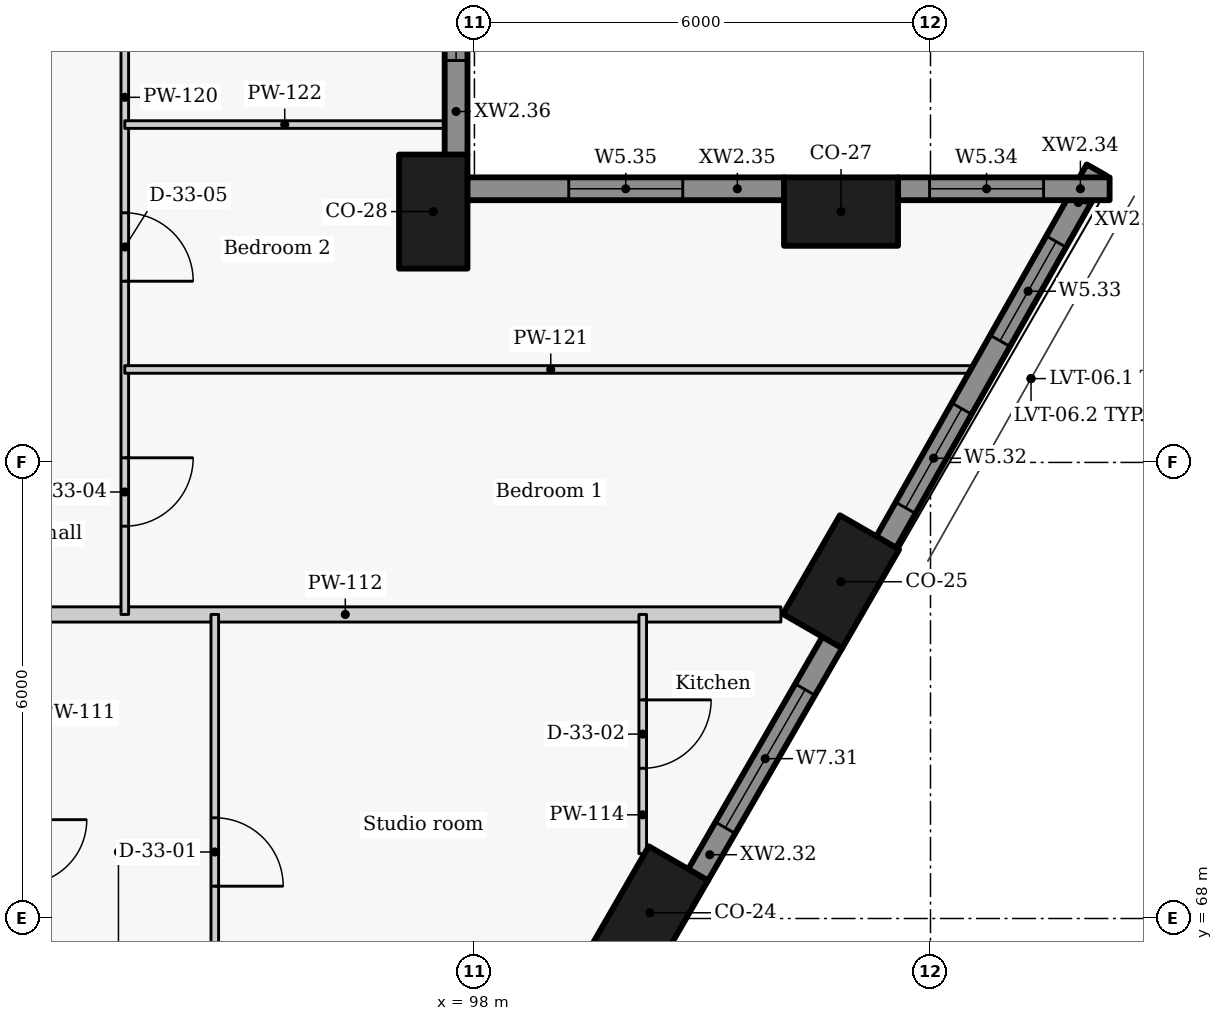
"""IFC4 building model, lengths in metres.
Left out: names, types, materials, properties, quantities, classifications, styles, units other than length and angle.
Written with IfcOpenShell. Run it as: python <this file> out.ifc"""

import sys

from ifc_helpers import new_model, si_unit, direction, frame, frame_2d, origin, origin_2d, place, context, subcontext, project, spatial, rectangle, extrude, element, fill, save


model = new_model("IFC4")
c1 = context("Model", 3, precision=1e-05, world=origin(), true_north=direction((0.0, 1.0)))
c2 = subcontext(c1, "Body", "Model", "MODEL_VIEW")
j1 = project(units=[si_unit("LENGTHUNIT", "METRE"), si_unit("PLANEANGLEUNIT", "RADIAN")], contexts=[c1])
p1 = place(None, origin())
s1 = spatial("IfcSite", under=j1, at=p1, CompositionType="ELEMENT")
p2 = place(p1, origin())
s2 = spatial("IfcBuilding", under=s1, at=p2, CompositionType="ELEMENT")
p3 = place(p2, frame((0.0, 0.0, 51.3)))
s3 = spatial("IfcBuildingStorey", under=s2, at=p3, CompositionType="ELEMENT", Elevation=51.3)
for number, where, z_axis, x_axis in (
    (1, (100.308, 68.075, 0.0), (0.0, 0.0, 1.0), (0.5, 0.866, 0.0)),
    (2, (102.823, 72.43, 0.0), (0.0, 0.0, 1.0), (0.5, 0.866, 0.0)),
    (3, (102.823, 77.3, 0.0), (0.0, 0.0, 1.0), (-1.0, 0.0, 0.0)),
    (4, (97.458, 77.3, 0.0), (0.0, 0.0, 1.0), (0.0, 1.0, 0.0)),
):
    element("IfcColumn", number, at=place(p3, frame(where, z_axis=z_axis, x_axis=x_axis)), inside=s3, PredefinedType="COLUMN", context=c2, shape_type="SweptSolid", body=[
        extrude(rectangle(XDim=1.5, YDim=0.9, at=origin_2d()), origin(), (0.0, 0.0, 1.0), 3.3),
    ])
p4 = place(p3, frame((100.941, 68.571, 0.0), z_axis=(0.0, 0.0, 1.0), x_axis=(0.499977402622, 0.866038449993, 0.0)))
e5 = element("IfcWall", 5, at=p4, inside=s3, PredefinedType="SOLIDWALL", context=c2, shape_type="SweptSolid", body=[
    extrude(rectangle(XDim=3.537, YDim=0.3, at=frame_2d((1.769, 0.0))), origin(), (0.0, 0.0, 1.0), 2.425),
])
p5 = place(p4, frame((0.719, 0.0, 0.9)))
e6 = element("IfcOpeningElement", 6, at=p5, cuts=e5, PredefinedType="OPENING", context=c2, shape_type="SweptSolid", body=[
    extrude(rectangle(XDim=2.1, YDim=1.1, at=frame_2d((1.05, 0.55))), frame((0.0, 0.16, 0.0), z_axis=(0.0, -1.0, 0.0), x_axis=(1.0, 0.0, 0.0)), (0.0, 0.0, 1.0), 0.32),
])
p6 = place(p3, frame((103.416, 72.949, 0.0), z_axis=(0.0, 0.0, 1.0), x_axis=(0.492363204642, 0.870389840655, 0.0)))
e7 = element("IfcWall", 7, at=p6, inside=s3, PredefinedType="SOLIDWALL", context=c2, shape_type="SweptSolid", body=[
    extrude(rectangle(XDim=5.626, YDim=0.3, at=frame_2d((2.813, 0.0))), origin(), (0.0, 0.0, 1.0), 2.425),
])
p7 = place(p6, frame((0.521, 0.0, 0.9)))
e8 = element("IfcOpeningElement", 8, at=p7, cuts=e7, PredefinedType="OPENING", context=c2, shape_type="SweptSolid", body=[
    extrude(rectangle(XDim=1.5, YDim=1.1, at=frame_2d((0.75, 0.55))), frame((0.0, 0.16, 0.0), z_axis=(0.0, -1.0, 0.0), x_axis=(1.0, 0.0, 0.0)), (0.0, 0.0, 1.0), 0.32),
])
p8 = place(p6, frame((3.045, 0.0, 0.9)))
e9 = element("IfcOpeningElement", 9, at=p8, cuts=e7, PredefinedType="OPENING", context=c2, shape_type="SweptSolid", body=[
    extrude(rectangle(XDim=1.5, YDim=1.1, at=frame_2d((0.75, 0.55))), frame((0.0, 0.16, 0.0), z_axis=(0.0, -1.0, 0.0), x_axis=(1.0, 0.0, 0.0)), (0.0, 0.0, 1.0), 0.32),
])
p9 = place(p3, frame((106.357, 77.6, 0.0), z_axis=(0.0, 0.0, 1.0), x_axis=(-1.0, 0.0, 0.0)))
e10 = element("IfcWall", 10, at=p9, inside=s3, PredefinedType="SOLIDWALL", context=c2, shape_type="SweptSolid", body=[
    extrude(rectangle(XDim=2.788, YDim=0.3, at=frame_2d((1.394, 0.0))), origin(), (0.0, 0.0, 1.0), 2.425),
])
p10 = place(p9, frame((0.869, 0.0, 0.9)))
e11 = element("IfcOpeningElement", 11, at=p10, cuts=e10, PredefinedType="OPENING", context=c2, shape_type="SweptSolid", body=[
    extrude(rectangle(XDim=1.5, YDim=1.1, at=frame_2d((0.75, 0.55))), frame((0.0, 0.16, 0.0), z_axis=(0.0, -1.0, 0.0), x_axis=(1.0, 0.0, 0.0)), (0.0, 0.0, 1.0), 0.32),
])
p11 = place(p3, frame((102.077, 77.6, 0.0), z_axis=(0.0, 0.0, 1.0), x_axis=(-1.0, 0.0, 0.0)))
e12 = element("IfcWall", 12, at=p11, inside=s3, PredefinedType="SOLIDWALL", context=c2, shape_type="SweptSolid", body=[
    extrude(rectangle(XDim=4.173, YDim=0.3, at=frame_2d((2.086, 0.0))), origin(), (0.0, 0.0, 1.0), 2.425),
])
p12 = place(p11, frame((1.336, 0.0, 0.9)))
e13 = element("IfcOpeningElement", 13, at=p12, cuts=e12, PredefinedType="OPENING", context=c2, shape_type="SweptSolid", body=[
    extrude(rectangle(XDim=1.5, YDim=1.1, at=frame_2d((0.75, 0.55))), frame((0.0, 0.16, 0.0), z_axis=(0.0, -1.0, 0.0), x_axis=(1.0, 0.0, 0.0)), (0.0, 0.0, 1.0), 0.32),
])
p13 = place(p3, frame((97.758, 78.046, 0.0), z_axis=(0.0, 0.0, 1.0), x_axis=(0.0, 1.0, 0.0)))
e14 = element("IfcWall", 14, at=p13, inside=s3, PredefinedType="SOLIDWALL", context=c2, shape_type="SweptSolid", body=[
    extrude(rectangle(XDim=4.208, YDim=0.3, at=frame_2d((2.104, 0.0))), origin(), (0.0, 0.0, 1.0), 2.425),
])
p14 = place(p13, frame((1.242, 0.0, 0.9)))
e15 = element("IfcOpeningElement", 15, at=p14, cuts=e14, PredefinedType="OPENING", context=c2, shape_type="SweptSolid", body=[
    extrude(rectangle(XDim=2.1, YDim=1.1, at=frame_2d((1.05, 0.55))), frame((0.0, 0.16, 0.0), z_axis=(0.0, -1.0, 0.0), x_axis=(1.0, 0.0, 0.0)), (0.0, 0.0, 1.0), 0.32),
])
p15 = place(p3, frame((90.57, 72.0, 0.0), z_axis=(0.0, 0.0, 1.0), x_axis=(1.0, 0.0, 0.0)))
e16 = element("IfcWall", 16, at=p15, inside=s3, PredefinedType="PARTITIONING", context=c2, shape_type="SweptSolid", body=[
    extrude(rectangle(XDim=11.462, YDim=0.2, at=frame_2d((5.731, 0.0))), origin(), (0.0, 0.0, 1.0), 3.025),
])
p16 = place(p3, frame((94.584, 72.0, 0.0), z_axis=(0.0, 0.0, 1.0), x_axis=(0.0, -1.0, 0.0)))
e17 = element("IfcWall", 17, at=p16, inside=s3, PredefinedType="PARTITIONING", context=c2, shape_type="SweptSolid", body=[
    extrude(rectangle(XDim=6.25, YDim=0.1, at=frame_2d((3.125, 0.0))), origin(), (0.0, 0.0, 1.0), 3.025),
])
p17 = place(p16, frame((2.675, 0.0, 0.0)))
e18 = element("IfcOpeningElement", 18, at=p17, cuts=e17, PredefinedType="OPENING", context=c2, shape_type="SweptSolid", body=[
    extrude(rectangle(XDim=0.9, YDim=2.1, at=frame_2d((0.45, 1.05))), frame((0.0, 0.06, 0.0), z_axis=(0.0, -1.0, 0.0), x_axis=(1.0, 0.0, 0.0)), (0.0, 0.0, 1.0), 0.12),
])
p18 = place(p3, frame((100.214, 72.0, 0.0), z_axis=(0.0, 0.0, 1.0), x_axis=(0.0, -1.0, 0.0)))
e19 = element("IfcWall", 19, at=p18, inside=s3, PredefinedType="PARTITIONING", context=c2, shape_type="SweptSolid", body=[
    extrude(rectangle(XDim=3.148, YDim=0.1, at=frame_2d((1.574, 0.0))), origin(), (0.0, 0.0, 1.0), 3.025),
])
p19 = place(p18, frame((1.124, 0.0, 0.0)))
e20 = element("IfcOpeningElement", 20, at=p19, cuts=e19, PredefinedType="OPENING", context=c2, shape_type="SweptSolid", body=[
    extrude(rectangle(XDim=0.9, YDim=2.1, at=frame_2d((0.45, 1.05))), frame((0.0, 0.06, 0.0), z_axis=(0.0, -1.0, 0.0), x_axis=(1.0, 0.0, 0.0)), (0.0, 0.0, 1.0), 0.12),
])
p20 = place(p3, frame((93.4, 83.1, 0.0), z_axis=(0.0, 0.0, 1.0), x_axis=(0.0, -1.0, 0.0)))
e21 = element("IfcWall", 21, at=p20, inside=s3, PredefinedType="PARTITIONING", context=c2, shape_type="SweptSolid", body=[
    extrude(rectangle(XDim=11.1, YDim=0.1, at=frame_2d((5.55, 0.0))), origin(), (0.0, 0.0, 1.0), 3.025),
])
p21 = place(p20, frame((9.039, 0.0, 0.0)))
e22 = element("IfcOpeningElement", 22, at=p21, cuts=e21, PredefinedType="OPENING", context=c2, shape_type="SweptSolid", body=[
    extrude(rectangle(XDim=0.9, YDim=2.1, at=frame_2d((0.45, 1.05))), frame((0.0, 0.06, 0.0), z_axis=(0.0, -1.0, 0.0), x_axis=(1.0, 0.0, 0.0)), (0.0, 0.0, 1.0), 0.12),
])
p22 = place(p20, frame((5.816, 0.0, 0.0)))
e23 = element("IfcOpeningElement", 23, at=p22, cuts=e21, PredefinedType="OPENING", context=c2, shape_type="SweptSolid", body=[
    extrude(rectangle(XDim=0.9, YDim=2.1, at=frame_2d((0.45, 1.05))), frame((0.0, 0.06, 0.0), z_axis=(0.0, -1.0, 0.0), x_axis=(1.0, 0.0, 0.0)), (0.0, 0.0, 1.0), 0.12),
])
p23 = place(p20, frame((1.877, 0.0, 0.0)))
e24 = element("IfcOpeningElement", 24, at=p23, cuts=e21, PredefinedType="OPENING", context=c2, shape_type="SweptSolid", body=[
    extrude(rectangle(XDim=0.9, YDim=2.1, at=frame_2d((0.45, 1.05))), frame((0.0, 0.06, 0.0), z_axis=(0.0, -1.0, 0.0), x_axis=(1.0, 0.0, 0.0)), (0.0, 0.0, 1.0), 0.12),
])
p24 = place(p3, frame((93.4, 75.223, 0.0), z_axis=(0.0, 0.0, 1.0), x_axis=(1.0, 0.0, 0.0)))
e25 = element("IfcWall", 25, at=p24, inside=s3, PredefinedType="PARTITIONING", context=c2, shape_type="SweptSolid", body=[
    extrude(rectangle(XDim=11.208, YDim=0.1, at=frame_2d((5.604, 0.0))), origin(), (0.0, 0.0, 1.0), 2.405),
])
p25 = place(p3, frame((93.4, 78.445, 0.0), z_axis=(0.0, 0.0, 1.0), x_axis=(1.0, 0.0, 0.0)))
e26 = element("IfcWall", 26, at=p25, inside=s3, PredefinedType="PARTITIONING", context=c2, shape_type="SweptSolid", body=[
    extrude(rectangle(XDim=4.208, YDim=0.1, at=frame_2d((2.104, 0.0))), origin(), (0.0, 0.0, 1.0), 2.405),
])
p26 = place(p5, origin())
e27 = element("IfcWindow", 27, at=p26, inside=s3, PartitioningType="SINGLE_PANEL", PredefinedType="WINDOW", context=c2, shape_type="SweptSolid", body=[
    extrude(rectangle(XDim=2.1, YDim=1.1, at=frame_2d((1.05, 0.55))), frame((0.0, 0.03, 0.0), z_axis=(0.0, -1.0, 0.0), x_axis=(1.0, 0.0, 0.0)), (0.0, 0.0, 1.0), 0.06),
])
fill(e6, e27)
p27 = place(p7, origin())
e28 = element("IfcWindow", 28, at=p27, inside=s3, PartitioningType="SINGLE_PANEL", PredefinedType="WINDOW", context=c2, shape_type="SweptSolid", body=[
    extrude(rectangle(XDim=1.5, YDim=1.1, at=frame_2d((0.75, 0.55))), frame((0.0, 0.03, 0.0), z_axis=(0.0, -1.0, 0.0), x_axis=(1.0, 0.0, 0.0)), (0.0, 0.0, 1.0), 0.06),
])
fill(e8, e28)
p28 = place(p8, origin())
e29 = element("IfcWindow", 29, at=p28, inside=s3, PartitioningType="SINGLE_PANEL", PredefinedType="WINDOW", context=c2, shape_type="SweptSolid", body=[
    extrude(rectangle(XDim=1.5, YDim=1.1, at=frame_2d((0.75, 0.55))), frame((0.0, 0.03, 0.0), z_axis=(0.0, -1.0, 0.0), x_axis=(1.0, 0.0, 0.0)), (0.0, 0.0, 1.0), 0.06),
])
fill(e9, e29)
p29 = place(p10, origin())
e30 = element("IfcWindow", 30, at=p29, inside=s3, PartitioningType="SINGLE_PANEL", PredefinedType="WINDOW", context=c2, shape_type="SweptSolid", body=[
    extrude(rectangle(XDim=1.5, YDim=1.1, at=frame_2d((0.75, 0.55))), frame((0.0, 0.03, 0.0), z_axis=(0.0, -1.0, 0.0), x_axis=(1.0, 0.0, 0.0)), (0.0, 0.0, 1.0), 0.06),
])
fill(e11, e30)
p30 = place(p12, origin())
e31 = element("IfcWindow", 31, at=p30, inside=s3, PartitioningType="SINGLE_PANEL", PredefinedType="WINDOW", context=c2, shape_type="SweptSolid", body=[
    extrude(rectangle(XDim=1.5, YDim=1.1, at=frame_2d((0.75, 0.55))), frame((0.0, 0.03, 0.0), z_axis=(0.0, -1.0, 0.0), x_axis=(1.0, 0.0, 0.0)), (0.0, 0.0, 1.0), 0.06),
])
fill(e13, e31)
p31 = place(p14, origin())
e32 = element("IfcWindow", 32, at=p31, inside=s3, PartitioningType="SINGLE_PANEL", PredefinedType="WINDOW", context=c2, shape_type="SweptSolid", body=[
    extrude(rectangle(XDim=2.1, YDim=1.1, at=frame_2d((1.05, 0.55))), frame((0.0, 0.03, 0.0), z_axis=(0.0, -1.0, 0.0), x_axis=(1.0, 0.0, 0.0)), (0.0, 0.0, 1.0), 0.06),
])
fill(e15, e32)
p32 = place(p17, origin())
e33 = element("IfcDoor", 33, at=p32, inside=s3, OperationType="SINGLE_SWING_RIGHT", PredefinedType="DOOR", context=c2, shape_type="SweptSolid", body=[
    extrude(rectangle(XDim=0.9, YDim=2.1, at=frame_2d((0.45, 1.05))), frame((0.0, 0.025, 0.0), z_axis=(0.0, -1.0, 0.0), x_axis=(1.0, 0.0, 0.0)), (0.0, 0.0, 1.0), 0.05),
])
fill(e18, e33)
p33 = place(p19, origin())
e34 = element("IfcDoor", 34, at=p33, inside=s3, OperationType="SINGLE_SWING_LEFT", PredefinedType="DOOR", context=c2, shape_type="SweptSolid", body=[
    extrude(rectangle(XDim=0.9, YDim=2.1, at=frame_2d((0.45, 1.05))), frame((0.0, 0.025, 0.0), z_axis=(0.0, -1.0, 0.0), x_axis=(1.0, 0.0, 0.0)), (0.0, 0.0, 1.0), 0.05),
])
fill(e20, e34)
p34 = place(p21, origin())
e35 = element("IfcDoor", 35, at=p34, inside=s3, OperationType="SINGLE_SWING_LEFT", PredefinedType="DOOR", context=c2, shape_type="SweptSolid", body=[
    extrude(rectangle(XDim=0.9, YDim=2.1, at=frame_2d((0.45, 1.05))), frame((0.0, 0.025, 0.0), z_axis=(0.0, -1.0, 0.0), x_axis=(1.0, 0.0, 0.0)), (0.0, 0.0, 1.0), 0.05),
])
fill(e22, e35)
p35 = place(p22, origin())
e36 = element("IfcDoor", 36, at=p35, inside=s3, OperationType="SINGLE_SWING_RIGHT", PredefinedType="DOOR", context=c2, shape_type="SweptSolid", body=[
    extrude(rectangle(XDim=0.9, YDim=2.1, at=frame_2d((0.45, 1.05))), frame((0.0, 0.025, 0.0), z_axis=(0.0, -1.0, 0.0), x_axis=(1.0, 0.0, 0.0)), (0.0, 0.0, 1.0), 0.05),
])
fill(e23, e36)
save(model, sys.argv[1])
